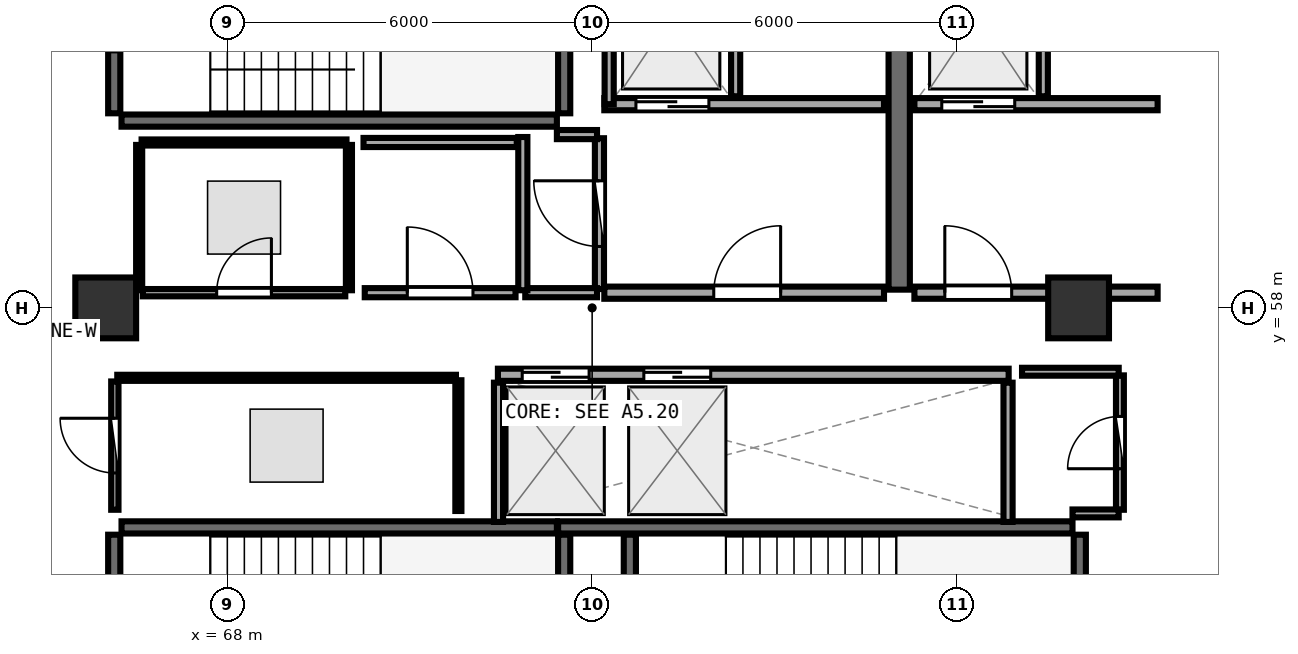
"""IFC4 building model, lengths in metres.
Left out: names, types, materials, properties, quantities, classifications, styles, units other than length and angle.
Written with IfcOpenShell. Run it as: python <this file> out.ifc"""

import sys

from ifc_helpers import new_model, si_unit, direction, frame, frame_2d, origin, origin_2d, place, context, subcontext, project, spatial, rectangle, extrude, element, fill, save


model = new_model("IFC4")
c1 = context("Model", 3, precision=1e-05, world=origin(), true_north=direction((0.0, 1.0)))
c2 = subcontext(c1, "Body", "Model", "MODEL_VIEW")
j1 = project(units=[si_unit("LENGTHUNIT", "METRE"), si_unit("PLANEANGLEUNIT", "RADIAN")], contexts=[c1])
p1 = place(None, origin())
s1 = spatial("IfcSite", under=j1, at=p1, CompositionType="ELEMENT")
p2 = place(p1, origin())
s2 = spatial("IfcBuilding", under=s1, at=p2, CompositionType="ELEMENT")
p3 = place(p2, frame((0.0, 0.0, 267.45)))
s3 = spatial("IfcBuildingStorey", under=s2, at=p3, CompositionType="ELEMENT", Elevation=267.45)
for number, where, z_axis, x_axis in (
    (1, (82.0, 58.0, 0.0), (0.0, 0.0, 1.0), (1.0, 0.0, 0.0)),
    (2, (66.0, 58.0, 0.0), (0.0, 0.0, 1.0), (1.0, 0.0, 0.0)),
):
    element("IfcColumn", number, at=place(p3, frame(where, z_axis=z_axis, x_axis=x_axis)), inside=s3, PredefinedType="PILASTER", context=c2, shape_type="SweptSolid", body=[
        extrude(rectangle(XDim=1.0, YDim=1.0, at=origin_2d()), origin(), (0.0, 0.0, 1.0), 3.75),
    ])
p4 = place(p3, frame((66.26, 61.08, 0.0), z_axis=(0.0, 0.0, 1.0), x_axis=(1.0, 0.0, 0.0)))
e3 = element("IfcWall", 3, at=p4, inside=s3, PredefinedType="SHEAR", context=c2, shape_type="SweptSolid", body=[
    extrude(rectangle(XDim=7.16, YDim=0.2, at=frame_2d((3.58, 0.0))), origin(), (0.0, 0.0, 1.0), 3.49),
])
p5 = place(p3, frame((73.54, 61.2, 0.0), z_axis=(0.0, 0.0, 1.0), x_axis=(0.0, 1.0, 0.0)))
e4 = element("IfcWall", 4, at=p5, inside=s3, PredefinedType="SHEAR", context=c2, shape_type="SweptSolid", body=[
    extrude(rectangle(XDim=3.07, YDim=0.2, at=frame_2d((1.535, 0.0))), origin(), (0.0, 0.0, 1.0), 3.49),
])
p6 = place(p3, frame((66.14, 64.27, 0.0), z_axis=(0.0, 0.0, 1.0), x_axis=(0.0, -1.0, 0.0)))
e5 = element("IfcWall", 5, at=p6, inside=s3, PredefinedType="SHEAR", context=c2, shape_type="SweptSolid", body=[
    extrude(rectangle(XDim=3.07, YDim=0.2, at=frame_2d((1.535, 0.0))), origin(), (0.0, 0.0, 1.0), 3.49),
])
p7 = place(p6, frame((1.01, 0.0, 0.0)))
e6 = element("IfcOpeningElement", 6, at=p7, cuts=e5, PredefinedType="OPENING", context=c2, shape_type="SweptSolid", body=[
    extrude(rectangle(XDim=1.05, YDim=2.1, at=frame_2d((0.525, 1.05))), frame((0.0, 0.11, 0.0), z_axis=(0.0, -1.0, 0.0), x_axis=(1.0, 0.0, 0.0)), (0.0, 0.0, 1.0), 0.22),
])
p8 = place(p3, frame((82.02, 51.2, 0.0), z_axis=(0.0, 0.0, 1.0), x_axis=(0.0, 1.0, 0.0)))
e7 = element("IfcWall", 7, at=p8, inside=s3, PredefinedType="SHEAR", context=c2, shape_type="SweptSolid", body=[
    extrude(rectangle(XDim=3.07, YDim=0.2, at=frame_2d((1.535, 0.0))), origin(), (0.0, 0.0, 1.0), 3.49),
])
p9 = place(p3, frame((81.9, 54.39, 0.0), z_axis=(0.0, 0.0, 1.0), x_axis=(-1.0, 0.0, 0.0)))
e8 = element("IfcWall", 8, at=p9, inside=s3, PredefinedType="SHEAR", context=c2, shape_type="SweptSolid", body=[
    extrude(rectangle(XDim=8.46, YDim=0.2, at=frame_2d((4.23, 0.0))), origin(), (0.0, 0.0, 1.0), 3.49),
])
for number, where, z_axis, x_axis in (
    (9, (74.62, 54.27, 0.0), (0.0, 0.0, 1.0), (0.0, -1.0, 0.0)),
    (10, (73.54, 51.2, 0.0), (0.0, 0.0, 1.0), (0.0, 1.0, 0.0)),
):
    element("IfcWall", number, at=place(p3, frame(where, z_axis=z_axis, x_axis=x_axis)), inside=s3, PredefinedType="SHEAR", context=c2, shape_type="SweptSolid", body=[
        extrude(rectangle(XDim=3.07, YDim=0.2, at=frame_2d((1.535, 0.0))), origin(), (0.0, 0.0, 1.0), 3.49),
    ])
p10 = place(p3, frame((73.42, 54.39, 0.0), z_axis=(0.0, 0.0, 1.0), x_axis=(-1.0, 0.0, 0.0)))
e11 = element("IfcWall", 11, at=p10, inside=s3, PredefinedType="SHEAR", context=c2, shape_type="SweptSolid", body=[
    extrude(rectangle(XDim=7.16, YDim=0.2, at=frame_2d((3.58, 0.0))), origin(), (0.0, 0.0, 1.0), 3.49),
])
p11 = place(p3, frame((66.14, 54.27, 0.0), z_axis=(0.0, 0.0, 1.0), x_axis=(0.0, -1.0, 0.0)))
e12 = element("IfcWall", 12, at=p11, inside=s3, PredefinedType="SHEAR", context=c2, shape_type="SweptSolid", body=[
    extrude(rectangle(XDim=3.07, YDim=0.2, at=frame_2d((1.535, 0.0))), origin(), (0.0, 0.0, 1.0), 3.49),
])
p12 = place(p11, frame((1.01, 0.0, 0.0)))
e13 = element("IfcOpeningElement", 13, at=p12, cuts=e12, PredefinedType="OPENING", context=c2, shape_type="SweptSolid", body=[
    extrude(rectangle(XDim=1.05, YDim=2.1, at=frame_2d((0.525, 1.05))), frame((0.0, 0.11, 0.0), z_axis=(0.0, -1.0, 0.0), x_axis=(1.0, 0.0, 0.0)), (0.0, 0.0, 1.0), 0.22),
])
p13 = place(p3, frame((79.05, 58.3, 0.0), z_axis=(0.0, 0.0, 1.0), x_axis=(0.0, 1.0, 0.0)))
e14 = element("IfcWall", 14, at=p13, inside=s3, PredefinedType="SHEAR", context=c2, shape_type="SweptSolid", body=[
    extrude(rectangle(XDim=6.3, YDim=0.35, at=frame_2d((3.15, 0.0))), origin(), (0.0, 0.0, 1.0), 3.49),
])
p14 = place(p3, frame((74.2, 61.35, 0.0), z_axis=(0.0, 0.0, 1.0), x_axis=(1.0, 0.0, 0.0)))
e15 = element("IfcWall", 15, at=p14, inside=s3, PredefinedType="SOLIDWALL", context=c2, shape_type="SweptSolid", body=[
    extrude(rectangle(XDim=4.6, YDim=0.2, at=frame_2d((2.3, 0.0))), origin(), (0.0, 0.0, 1.0), 3.48),
])
p15 = place(p14, frame((0.52, 0.0, 0.0)))
e16 = element("IfcOpeningElement", 16, at=p15, cuts=e15, PredefinedType="OPENING", context=c2, shape_type="SweptSolid", body=[
    extrude(rectangle(XDim=1.2, YDim=2.15, at=frame_2d((0.6, 1.075))), frame((0.0, 0.11, 0.0), z_axis=(0.0, -1.0, 0.0), x_axis=(1.0, 0.0, 0.0)), (0.0, 0.0, 1.0), 0.22),
])
p16 = place(p3, frame((74.28, 61.35, 0.0), z_axis=(0.0, 0.0, 1.0), x_axis=(0.0, 1.0, 0.0)))
e17 = element("IfcWall", 17, at=p16, inside=s3, PredefinedType="PARTITIONING", context=c2, shape_type="SweptSolid", body=[
    extrude(rectangle(XDim=2.97, YDim=0.15, at=frame_2d((1.485, 0.0))), origin(), (0.0, 0.0, 1.0), 3.48),
])
p17 = place(p3, frame((76.36, 61.48, 0.0), z_axis=(0.0, 0.0, 1.0), x_axis=(0.0, 1.0, 0.0)))
e18 = element("IfcWall", 18, at=p17, inside=s3, PredefinedType="PARTITIONING", context=c2, shape_type="SweptSolid", body=[
    extrude(rectangle(XDim=2.84, YDim=0.15, at=frame_2d((1.42, 0.0))), origin(), (0.0, 0.0, 1.0), 3.48),
])
p18 = place(p3, frame((79.3, 61.35, 0.0), z_axis=(0.0, 0.0, 1.0), x_axis=(1.0, 0.0, 0.0)))
e19 = element("IfcWall", 19, at=p18, inside=s3, PredefinedType="SOLIDWALL", context=c2, shape_type="SweptSolid", body=[
    extrude(rectangle(XDim=4.0, YDim=0.2, at=frame_2d((2.0, 0.0))), origin(), (0.0, 0.0, 1.0), 2.775),
])
p19 = place(p18, frame((0.45, 0.0, 0.0)))
e20 = element("IfcOpeningElement", 20, at=p19, cuts=e19, PredefinedType="OPENING", context=c2, shape_type="SweptSolid", body=[
    extrude(rectangle(XDim=1.2, YDim=2.15, at=frame_2d((0.6, 1.075))), frame((0.0, 0.11, 0.0), z_axis=(0.0, -1.0, 0.0), x_axis=(1.0, 0.0, 0.0)), (0.0, 0.0, 1.0), 0.22),
])
p20 = place(p3, frame((81.42, 61.48, 0.0), z_axis=(0.0, 0.0, 1.0), x_axis=(0.0, 1.0, 0.0)))
e21 = element("IfcWall", 21, at=p20, inside=s3, PredefinedType="PARTITIONING", context=c2, shape_type="SweptSolid", body=[
    extrude(rectangle(XDim=2.84, YDim=0.15, at=frame_2d((1.42, 0.0))), origin(), (0.0, 0.0, 1.0), 3.48),
])
p21 = place(p3, frame((74.2, 58.25, 0.0), z_axis=(0.0, 0.0, 1.0), x_axis=(1.0, 0.0, 0.0)))
e22 = element("IfcWall", 22, at=p21, inside=s3, PredefinedType="SOLIDWALL", context=c2, shape_type="SweptSolid", body=[
    extrude(rectangle(XDim=4.6, YDim=0.2, at=frame_2d((2.3, 0.0))), origin(), (0.0, 0.0, 1.0), 3.48),
])
p22 = place(p21, frame((1.8, 0.0, 0.0)))
e23 = element("IfcOpeningElement", 23, at=p22, cuts=e22, PredefinedType="OPENING", context=c2, shape_type="SweptSolid", body=[
    extrude(rectangle(XDim=1.1, YDim=2.1, at=frame_2d((0.55, 1.05))), frame((0.0, 0.11, 0.0), z_axis=(0.0, -1.0, 0.0), x_axis=(1.0, 0.0, 0.0)), (0.0, 0.0, 1.0), 0.22),
])
p23 = place(p3, frame((79.3, 58.25, 0.0), z_axis=(0.0, 0.0, 1.0), x_axis=(1.0, 0.0, 0.0)))
e24 = element("IfcWall", 24, at=p23, inside=s3, PredefinedType="SOLIDWALL", context=c2, shape_type="SweptSolid", body=[
    extrude(rectangle(XDim=4.0, YDim=0.2, at=frame_2d((2.0, 0.0))), origin(), (0.0, 0.0, 1.0), 2.775),
])
p24 = place(p23, frame((0.5, 0.0, 0.0)))
e25 = element("IfcOpeningElement", 25, at=p24, cuts=e24, PredefinedType="OPENING", context=c2, shape_type="SweptSolid", body=[
    extrude(rectangle(XDim=1.1, YDim=2.1, at=frame_2d((0.55, 1.05))), frame((0.0, 0.11, 0.0), z_axis=(0.0, -1.0, 0.0), x_axis=(1.0, 0.0, 0.0)), (0.0, 0.0, 1.0), 0.22),
])
p25 = place(p3, frame((72.45, 56.9, 0.0), z_axis=(0.0, 0.0, 1.0), x_axis=(1.0, 0.0, 0.0)))
e26 = element("IfcWall", 26, at=p25, inside=s3, PredefinedType="SOLIDWALL", context=c2, shape_type="SweptSolid", body=[
    extrude(rectangle(XDim=8.4, YDim=0.2, at=frame_2d((4.2, 0.0))), origin(), (0.0, 0.0, 1.0), 3.48),
])
p26 = place(p25, frame((0.4, 0.0, 0.0)))
e27 = element("IfcOpeningElement", 27, at=p26, cuts=e26, PredefinedType="OPENING", context=c2, shape_type="SweptSolid", body=[
    extrude(rectangle(XDim=1.1, YDim=2.1, at=frame_2d((0.55, 1.05))), frame((0.0, 0.11, 0.0), z_axis=(0.0, -1.0, 0.0), x_axis=(1.0, 0.0, 0.0)), (0.0, 0.0, 1.0), 0.22),
])
p27 = place(p25, frame((2.4, 0.0, 0.0)))
e28 = element("IfcOpeningElement", 28, at=p27, cuts=e26, PredefinedType="OPENING", context=c2, shape_type="SweptSolid", body=[
    extrude(rectangle(XDim=1.1, YDim=2.1, at=frame_2d((0.55, 1.05))), frame((0.0, 0.11, 0.0), z_axis=(0.0, -1.0, 0.0), x_axis=(1.0, 0.0, 0.0)), (0.0, 0.0, 1.0), 0.22),
])
for number, where, z_axis, x_axis in (
    (29, (72.46, 54.48, 0.0), (0.0, 0.0, 1.0), (0.0, 1.0, 0.0)),
    (30, (80.84, 54.48, 0.0), (0.0, 0.0, 1.0), (0.0, 1.0, 0.0)),
):
    element("IfcWall", number, at=place(p3, frame(where, z_axis=z_axis, x_axis=x_axis)), inside=s3, PredefinedType="PARTITIONING", context=c2, shape_type="SweptSolid", body=[
        extrude(rectangle(XDim=2.29, YDim=0.15, at=frame_2d((1.145, 0.0))), origin(), (0.0, 0.0, 1.0), 3.48),
    ])
p28 = place(p3, frame((74.12, 58.31, 0.0), z_axis=(0.0, 0.0, 1.0), x_axis=(0.0, 1.0, 0.0)))
e31 = element("IfcWall", 31, at=p28, inside=s3, PredefinedType="PARTITIONING", context=c2, shape_type="SweptSolid", body=[
    extrude(rectangle(XDim=2.48, YDim=0.15, at=frame_2d((1.24, 0.0))), origin(), (0.0, 0.0, 1.0), 3.48),
])
p29 = place(p28, frame((0.7, 0.0, 0.0)))
e32 = element("IfcOpeningElement", 32, at=p29, cuts=e31, PredefinedType="OPENING", context=c2, shape_type="SweptSolid", body=[
    extrude(rectangle(XDim=1.08, YDim=2.1, at=frame_2d((0.54, 1.05))), frame((0.0, 0.085, 0.0), z_axis=(0.0, -1.0, 0.0), x_axis=(1.0, 0.0, 0.0)), (0.0, 0.0, 1.0), 0.17),
])
p30 = place(p3, frame((82.68, 54.68, 0.0), z_axis=(0.0, 0.0, 1.0), x_axis=(0.0, 1.0, 0.0)))
e33 = element("IfcWall", 33, at=p30, inside=s3, PredefinedType="PLUMBINGWALL", context=c2, shape_type="SweptSolid", body=[
    extrude(rectangle(XDim=2.21, YDim=0.13, at=frame_2d((1.105, 0.0))), origin(), (0.0, 0.0, 1.0), 3.48),
])
p31 = place(p30, frame((0.675, 0.0, 0.0)))
e34 = element("IfcOpeningElement", 34, at=p31, cuts=e33, PredefinedType="OPENING", context=c2, shape_type="SweptSolid", body=[
    extrude(rectangle(XDim=0.86, YDim=2.05, at=frame_2d((0.43, 1.025))), frame((0.0, 0.075, 0.0), z_axis=(0.0, -1.0, 0.0), x_axis=(1.0, 0.0, 0.0)), (0.0, 0.0, 1.0), 0.15),
])
p32 = place(p3, frame((66.61, 58.25, 0.0), z_axis=(0.0, 0.0, 1.0), x_axis=(1.0, 0.0, 0.0)))
e35 = element("IfcWall", 35, at=p32, inside=s3, PredefinedType="PARTITIONING", context=c2, shape_type="SweptSolid", body=[
    extrude(rectangle(XDim=3.33, YDim=0.12, at=frame_2d((1.665, 0.0))), origin(), (0.0, 0.0, 1.0), 3.48),
])
p33 = place(p32, frame((1.215, 0.0, 0.0)))
e36 = element("IfcOpeningElement", 36, at=p33, cuts=e35, PredefinedType="OPENING", context=c2, shape_type="SweptSolid", body=[
    extrude(rectangle(XDim=0.9, YDim=2.08, at=frame_2d((0.45, 1.04))), frame((0.0, 0.07, 0.0), z_axis=(0.0, -1.0, 0.0), x_axis=(1.0, 0.0, 0.0)), (0.0, 0.0, 1.0), 0.14),
])
p34 = place(p3, frame((70.26, 58.25, 0.0), z_axis=(0.0, 0.0, 1.0), x_axis=(1.0, 0.0, 0.0)))
e37 = element("IfcWall", 37, at=p34, inside=s3, PredefinedType="PARTITIONING", context=c2, shape_type="SweptSolid", body=[
    extrude(rectangle(XDim=2.48, YDim=0.15, at=frame_2d((1.24, 0.0))), origin(), (0.0, 0.0, 1.0), 3.48),
])
p35 = place(p34, frame((0.7, 0.0, 0.0)))
e38 = element("IfcOpeningElement", 38, at=p35, cuts=e37, PredefinedType="OPENING", context=c2, shape_type="SweptSolid", body=[
    extrude(rectangle(XDim=1.08, YDim=2.1, at=frame_2d((0.54, 1.05))), frame((0.0, 0.085, 0.0), z_axis=(0.0, -1.0, 0.0), x_axis=(1.0, 0.0, 0.0)), (0.0, 0.0, 1.0), 0.17),
])
p36 = place(p3, frame((66.15, 54.68, 0.0), z_axis=(0.0, 0.0, 1.0), x_axis=(0.0, 1.0, 0.0)))
e39 = element("IfcWall", 39, at=p36, inside=s3, PredefinedType="PARTITIONING", context=c2, shape_type="SweptSolid", body=[
    extrude(rectangle(XDim=2.11, YDim=0.12, at=frame_2d((1.055, 0.0))), origin(), (0.0, 0.0, 1.0), 2.775),
])
p37 = place(p36, frame((0.605, 0.0, 0.0)))
e40 = element("IfcOpeningElement", 40, at=p37, cuts=e39, PredefinedType="OPENING", context=c2, shape_type="SweptSolid", body=[
    extrude(rectangle(XDim=0.9, YDim=2.08, at=frame_2d((0.45, 1.04))), frame((0.0, 0.07, 0.0), z_axis=(0.0, -1.0, 0.0), x_axis=(1.0, 0.0, 0.0)), (0.0, 0.0, 1.0), 0.14),
])
p38 = place(p3, frame((72.9, 58.25, 0.0), z_axis=(0.0, 0.0, 1.0), x_axis=(1.0, 0.0, 0.0)))
e41 = element("IfcWall", 41, at=p38, inside=s3, PredefinedType="PARTITIONING", context=c2, shape_type="SweptSolid", body=[
    extrude(rectangle(XDim=1.18, YDim=0.15, at=frame_2d((0.59, 0.0))), origin(), (0.0, 0.0, 1.0), 3.48),
])
p39 = place(p3, frame((74.08, 60.85, 0.0), z_axis=(0.0, 0.0, 1.0), x_axis=(-1.0, 0.0, 0.0)))
e42 = element("IfcWall", 42, at=p39, inside=s3, PredefinedType="PARTITIONING", context=c2, shape_type="SweptSolid", body=[
    extrude(rectangle(XDim=0.66, YDim=0.15, at=frame_2d((0.33, 0.0))), origin(), (0.0, 0.0, 1.0), 3.48),
])
p40 = place(p3, frame((72.86, 60.81, 0.0), z_axis=(0.0, 0.0, 1.0), x_axis=(0.0, -1.0, 0.0)))
e43 = element("IfcWall", 43, at=p40, inside=s3, PredefinedType="PARTITIONING", context=c2, shape_type="SweptSolid", body=[
    extrude(rectangle(XDim=2.52, YDim=0.15, at=frame_2d((1.26, 0.0))), origin(), (0.0, 0.0, 1.0), 3.48),
])
p41 = place(p3, frame((81.9, 54.62, 0.0), z_axis=(0.0, 0.0, 1.0), x_axis=(1.0, 0.0, 0.0)))
e44 = element("IfcWall", 44, at=p41, inside=s3, PredefinedType="PLUMBINGWALL", context=c2, shape_type="SweptSolid", body=[
    extrude(rectangle(XDim=0.76, YDim=0.13, at=frame_2d((0.38, 0.0))), origin(), (0.0, 0.0, 1.0), 2.775),
])
p42 = place(p3, frame((82.66, 56.95, 0.0), z_axis=(0.0, 0.0, 1.0), x_axis=(-1.0, 0.0, 0.0)))
e45 = element("IfcWall", 45, at=p42, inside=s3, PredefinedType="PLUMBINGWALL", context=c2, shape_type="SweptSolid", body=[
    extrude(rectangle(XDim=1.59, YDim=0.13, at=frame_2d((0.795, 0.0))), origin(), (0.0, 0.0, 1.0), 2.775),
])
p43 = place(p3, frame((70.0, 58.29, 0.0), z_axis=(0.0, 0.0, 1.0), x_axis=(0.0, 1.0, 0.0)))
e46 = element("IfcWall", 46, at=p43, inside=s3, PredefinedType="PARTITIONING", context=c2, shape_type="SweptSolid", body=[
    extrude(rectangle(XDim=2.39, YDim=0.1, at=frame_2d((1.195, 0.0))), origin(), (0.0, 0.0, 1.0), 3.48),
])
p44 = place(p3, frame((69.96, 60.72, 0.0), z_axis=(0.0, 0.0, 1.0), x_axis=(-1.0, 0.0, 0.0)))
e47 = element("IfcWall", 47, at=p44, inside=s3, PredefinedType="PARTITIONING", context=c2, shape_type="SweptSolid", body=[
    extrude(rectangle(XDim=3.37, YDim=0.1, at=frame_2d((1.685, 0.0))), origin(), (0.0, 0.0, 1.0), 3.48),
])
p45 = place(p3, frame((66.55, 60.68, 0.0), z_axis=(0.0, 0.0, 1.0), x_axis=(0.0, -1.0, 0.0)))
e48 = element("IfcWall", 48, at=p45, inside=s3, PredefinedType="PARTITIONING", context=c2, shape_type="SweptSolid", body=[
    extrude(rectangle(XDim=2.39, YDim=0.1, at=frame_2d((1.195, 0.0))), origin(), (0.0, 0.0, 1.0), 3.48),
])
p46 = place(p3, frame((72.76, 60.72, 0.0), z_axis=(0.0, 0.0, 1.0), x_axis=(-1.0, 0.0, 0.0)))
e49 = element("IfcWall", 49, at=p46, inside=s3, PredefinedType="PARTITIONING", context=c2, shape_type="SweptSolid", body=[
    extrude(rectangle(XDim=2.52, YDim=0.15, at=frame_2d((1.26, 0.0))), origin(), (0.0, 0.0, 1.0), 3.48),
])
p47 = place(p3, frame((71.8, 54.66, 0.0), z_axis=(0.0, 0.0, 1.0), x_axis=(0.0, 1.0, 0.0)))
e50 = element("IfcWall", 50, at=p47, inside=s3, PredefinedType="PARTITIONING", context=c2, shape_type="SweptSolid", body=[
    extrude(rectangle(XDim=2.15, YDim=0.1, at=frame_2d((1.075, 0.0))), origin(), (0.0, 0.0, 1.0), 3.48),
])
p48 = place(p3, frame((71.76, 56.85, 0.0), z_axis=(0.0, 0.0, 1.0), x_axis=(-1.0, 0.0, 0.0)))
e51 = element("IfcWall", 51, at=p48, inside=s3, PredefinedType="PARTITIONING", context=c2, shape_type="SweptSolid", body=[
    extrude(rectangle(XDim=5.57, YDim=0.1, at=frame_2d((2.785, 0.0))), origin(), (0.0, 0.0, 1.0), 2.775),
])
p49 = place(p15, origin())
e52 = element("IfcDoor", 52, at=p49, inside=s3, OperationType="DOUBLE_DOOR_SLIDING", PredefinedType="DOOR", context=c2, shape_type="SweptSolid", body=[
    extrude(rectangle(XDim=1.2, YDim=2.15, at=frame_2d((0.6, 1.075))), frame((0.0, 0.025, 0.0), z_axis=(0.0, -1.0, 0.0), x_axis=(1.0, 0.0, 0.0)), (0.0, 0.0, 1.0), 0.05),
])
fill(e16, e52)
p50 = place(p19, origin())
e53 = element("IfcDoor", 53, at=p50, inside=s3, OperationType="DOUBLE_DOOR_SLIDING", PredefinedType="DOOR", context=c2, shape_type="SweptSolid", body=[
    extrude(rectangle(XDim=1.2, YDim=2.15, at=frame_2d((0.6, 1.075))), frame((0.0, 0.025, 0.0), z_axis=(0.0, -1.0, 0.0), x_axis=(1.0, 0.0, 0.0)), (0.0, 0.0, 1.0), 0.05),
])
fill(e20, e53)
p51 = place(p22, frame((1.1, 0.0, 0.0), z_axis=(0.0, 0.0, 1.0), x_axis=(-1.0, 0.0, 0.0)))
e54 = element("IfcDoor", 54, at=p51, inside=s3, OperationType="SINGLE_SWING_LEFT", PredefinedType="DOOR", context=c2, shape_type="SweptSolid", body=[
    extrude(rectangle(XDim=1.1, YDim=2.1, at=frame_2d((0.55, 1.05))), frame((0.0, 0.025, 0.0), z_axis=(0.0, -1.0, 0.0), x_axis=(1.0, 0.0, 0.0)), (0.0, 0.0, 1.0), 0.05),
])
fill(e23, e54)
p52 = place(p24, frame((1.1, 0.0, 0.0), z_axis=(0.0, 0.0, 1.0), x_axis=(-1.0, 0.0, 0.0)))
e55 = element("IfcDoor", 55, at=p52, inside=s3, OperationType="SINGLE_SWING_RIGHT", PredefinedType="DOOR", context=c2, shape_type="SweptSolid", body=[
    extrude(rectangle(XDim=1.1, YDim=2.1, at=frame_2d((0.55, 1.05))), frame((0.0, 0.025, 0.0), z_axis=(0.0, -1.0, 0.0), x_axis=(1.0, 0.0, 0.0)), (0.0, 0.0, 1.0), 0.05),
])
fill(e25, e55)
p53 = place(p26, origin())
e56 = element("IfcDoor", 56, at=p53, inside=s3, OperationType="DOUBLE_DOOR_SLIDING", PredefinedType="DOOR", context=c2, shape_type="SweptSolid", body=[
    extrude(rectangle(XDim=1.1, YDim=2.1, at=frame_2d((0.55, 1.05))), frame((0.0, 0.025, 0.0), z_axis=(0.0, -1.0, 0.0), x_axis=(1.0, 0.0, 0.0)), (0.0, 0.0, 1.0), 0.05),
])
fill(e27, e56)
p54 = place(p27, origin())
e57 = element("IfcDoor", 57, at=p54, inside=s3, OperationType="DOUBLE_DOOR_SLIDING", PredefinedType="DOOR", context=c2, shape_type="SweptSolid", body=[
    extrude(rectangle(XDim=1.1, YDim=2.1, at=frame_2d((0.55, 1.05))), frame((0.0, 0.025, 0.0), z_axis=(0.0, -1.0, 0.0), x_axis=(1.0, 0.0, 0.0)), (0.0, 0.0, 1.0), 0.05),
])
fill(e28, e57)
p55 = place(p29, origin())
e58 = element("IfcDoor", 58, at=p55, inside=s3, OperationType="SINGLE_SWING_RIGHT", PredefinedType="DOOR", context=c2, shape_type="SweptSolid", body=[
    extrude(rectangle(XDim=1.08, YDim=2.1, at=frame_2d((0.54, 1.05))), frame((0.0, 0.025, 0.0), z_axis=(0.0, -1.0, 0.0), x_axis=(1.0, 0.0, 0.0)), (0.0, 0.0, 1.0), 0.05),
])
fill(e32, e58)
p56 = place(p31, origin())
e59 = element("IfcDoor", 59, at=p56, inside=s3, OperationType="SINGLE_SWING_LEFT", PredefinedType="DOOR", context=c2, shape_type="SweptSolid", body=[
    extrude(rectangle(XDim=0.86, YDim=2.05, at=frame_2d((0.43, 1.025))), frame((0.0, 0.025, 0.0), z_axis=(0.0, -1.0, 0.0), x_axis=(1.0, 0.0, 0.0)), (0.0, 0.0, 1.0), 0.05),
])
fill(e34, e59)
p57 = place(p33, origin())
e60 = element("IfcDoor", 60, at=p57, inside=s3, OperationType="SINGLE_SWING_RIGHT", PredefinedType="DOOR", context=c2, shape_type="SweptSolid", body=[
    extrude(rectangle(XDim=0.9, YDim=2.08, at=frame_2d((0.45, 1.04))), frame((0.0, 0.025, 0.0), z_axis=(0.0, -1.0, 0.0), x_axis=(1.0, 0.0, 0.0)), (0.0, 0.0, 1.0), 0.05),
])
fill(e36, e60)
p58 = place(p35, origin())
e61 = element("IfcDoor", 61, at=p58, inside=s3, OperationType="SINGLE_SWING_LEFT", PredefinedType="DOOR", context=c2, shape_type="SweptSolid", body=[
    extrude(rectangle(XDim=1.08, YDim=2.1, at=frame_2d((0.54, 1.05))), frame((0.0, 0.025, 0.0), z_axis=(0.0, -1.0, 0.0), x_axis=(1.0, 0.0, 0.0)), (0.0, 0.0, 1.0), 0.05),
])
fill(e38, e61)
p59 = place(p37, origin())
e62 = element("IfcDoor", 62, at=p59, inside=s3, OperationType="SINGLE_SWING_RIGHT", PredefinedType="DOOR", context=c2, shape_type="SweptSolid", body=[
    extrude(rectangle(XDim=0.9, YDim=2.08, at=frame_2d((0.45, 1.04))), frame((0.0, 0.025, 0.0), z_axis=(0.0, -1.0, 0.0), x_axis=(1.0, 0.0, 0.0)), (0.0, 0.0, 1.0), 0.05),
])
fill(e40, e62)
save(model, sys.argv[1])
